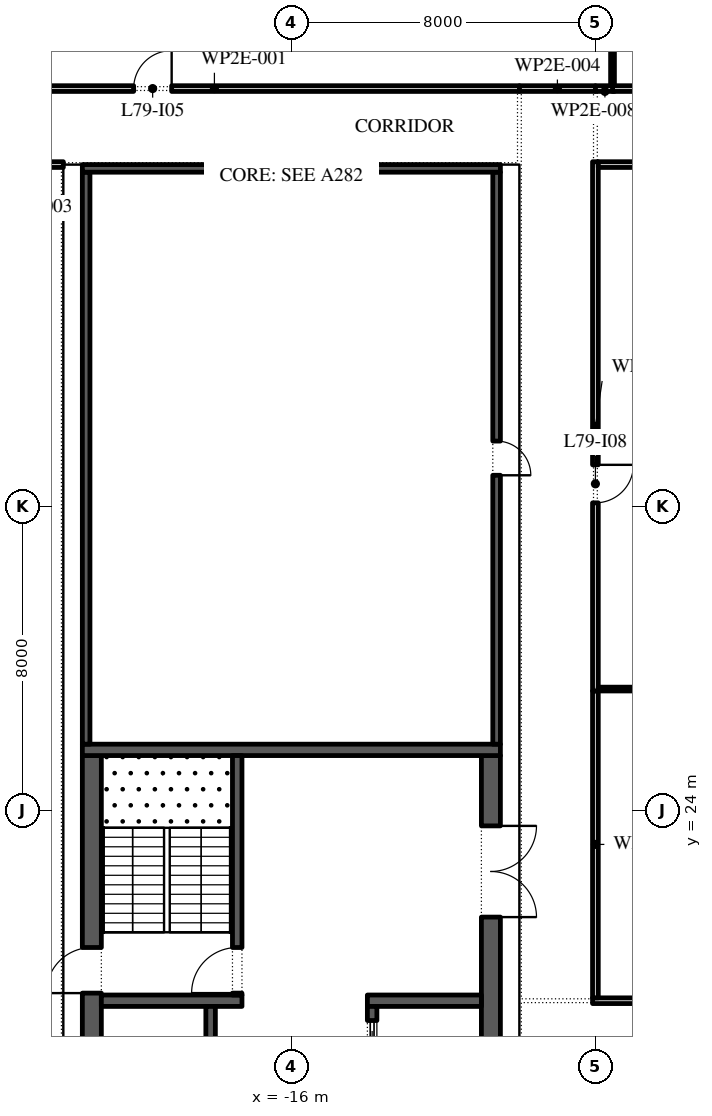
"""IFC4 building model, lengths in metres.
Left out: names, types, materials, properties, quantities, classifications, styles, units other than length and angle.
Written with IfcOpenShell. Run it as: python <this file> out.ifc"""

import sys

from ifc_helpers import new_model, si_unit, direction, frame, frame_2d, origin, place, context, subcontext, project, spatial, rectangle, extrude, element, fill, save


model = new_model("IFC4")
c1 = context("Model", 3, precision=1e-05, world=origin(), true_north=direction((0.0, 1.0)))
c2 = subcontext(c1, "Body", "Model", "MODEL_VIEW")
j1 = project(units=[si_unit("LENGTHUNIT", "METRE"), si_unit("PLANEANGLEUNIT", "RADIAN")], contexts=[c1])
p1 = place(None, origin())
s1 = spatial("IfcSite", under=j1, at=p1, CompositionType="ELEMENT")
p2 = place(p1, origin())
s2 = spatial("IfcBuilding", under=s1, at=p2, CompositionType="ELEMENT")
p3 = place(p2, frame((0.0, 0.0, 359.4)))
s3 = spatial("IfcBuildingStorey", under=s2, at=p3, CompositionType="ELEMENT", Elevation=359.4)
p4 = place(p3, frame((-21.25, -2.45, 0.0), z_axis=(0.0, 0.0, 1.0), x_axis=(0.0, 1.0, 0.0)))
e1 = element("IfcWall", 1, at=p4, inside=s3, PredefinedType="SHEAR", context=c2, shape_type="SweptSolid", body=[
    extrude(rectangle(XDim=27.9, YDim=0.5, at=frame_2d((13.95, 0.0))), origin(), (0.0, 0.0, 1.0), 3.9),
])
p5 = place(p4, frame((5.05, 0.0, 0.0)))
e2 = element("IfcOpeningElement", 2, at=p5, cuts=e1, PredefinedType="OPENING", context=c2, shape_type="SweptSolid", body=[
    extrude(rectangle(XDim=1.2, YDim=2.1, at=frame_2d((0.6, 1.05))), frame((0.0, 0.26, 0.0), z_axis=(0.0, -1.0, 0.0), x_axis=(1.0, 0.0, 0.0)), (0.0, 0.0, 1.0), 0.52),
])
p6 = place(p4, frame((21.65, 0.0, 0.0)))
e3 = element("IfcOpeningElement", 3, at=p6, cuts=e1, PredefinedType="OPENING", context=c2, shape_type="SweptSolid", body=[
    extrude(rectangle(XDim=1.2, YDim=2.1, at=frame_2d((0.6, 1.05))), frame((0.0, 0.26, 0.0), z_axis=(0.0, -1.0, 0.0), x_axis=(1.0, 0.0, 0.0)), (0.0, 0.0, 1.0), 0.52),
])
p7 = place(p3, frame((-10.75, -2.45, 0.0), z_axis=(0.0, 0.0, 1.0), x_axis=(0.0, 1.0, 0.0)))
e4 = element("IfcWall", 4, at=p7, inside=s3, PredefinedType="SHEAR", context=c2, shape_type="SweptSolid", body=[
    extrude(rectangle(XDim=27.9, YDim=0.5, at=frame_2d((13.95, 0.0))), origin(), (0.0, 0.0, 1.0), 3.9),
])
p8 = place(p7, frame((23.65, 0.0, 0.0)))
e5 = element("IfcOpeningElement", 5, at=p8, cuts=e4, PredefinedType="OPENING", context=c2, shape_type="SweptSolid", body=[
    extrude(rectangle(XDim=2.4, YDim=2.1, at=frame_2d((1.2, 1.05))), frame((0.0, 0.26, 0.0), z_axis=(0.0, -1.0, 0.0), x_axis=(1.0, 0.0, 0.0)), (0.0, 0.0, 1.0), 0.52),
])
p9 = place(p7, frame((0.788, 0.0, 0.0)))
e6 = element("IfcOpeningElement", 6, at=p9, cuts=e4, PredefinedType="OPENING", context=c2, shape_type="SweptSolid", body=[
    extrude(rectangle(XDim=0.9, YDim=2.1, at=frame_2d((0.45, 1.05))), frame((0.0, 0.26, 0.0), z_axis=(0.0, -1.0, 0.0), x_axis=(1.0, 0.0, 0.0)), (0.0, 0.0, 1.0), 0.52),
])
p10 = place(p7, frame((3.962, 0.0, 0.0)))
e7 = element("IfcOpeningElement", 7, at=p10, cuts=e4, PredefinedType="OPENING", context=c2, shape_type="SweptSolid", body=[
    extrude(rectangle(XDim=1.0, YDim=2.1, at=frame_2d((0.5, 1.05))), frame((0.0, 0.26, 0.0), z_axis=(0.0, -1.0, 0.0), x_axis=(1.0, 0.0, 0.0)), (0.0, 0.0, 1.0), 0.52),
])
p11 = place(p3, frame((-21.5, 25.6, 0.0), z_axis=(0.0, 0.0, 1.0), x_axis=(1.0, 0.0, 0.0)))
e8 = element("IfcWall", 8, at=p11, inside=s3, PredefinedType="SHEAR", context=c2, shape_type="SweptSolid", body=[
    extrude(rectangle(XDim=11.0, YDim=0.3, at=frame_2d((5.5, 0.0))), origin(), (0.0, 0.0, 1.0), 3.9),
])
p12 = place(p3, frame((-21.0, 19.0, 0.0), z_axis=(0.0, 0.0, 1.0), x_axis=(1.0, 0.0, 0.0)))
e9 = element("IfcWall", 9, at=p12, inside=s3, PredefinedType="SHEAR", context=c2, shape_type="SweptSolid", body=[
    extrude(rectangle(XDim=3.7, YDim=0.3, at=frame_2d((1.85, 0.0))), origin(), (0.0, 0.0, 1.0), 3.9),
])
p13 = place(p3, frame((-17.425, 19.15, 0.0), z_axis=(0.0, 0.0, 1.0), x_axis=(0.0, 1.0, 0.0)))
e10 = element("IfcWall", 10, at=p13, inside=s3, PredefinedType="SHEAR", context=c2, shape_type="SweptSolid", body=[
    extrude(rectangle(XDim=6.3, YDim=0.25, at=frame_2d((3.15, 0.0))), origin(), (0.0, 0.0, 1.0), 3.9),
])
p14 = place(p13, frame((0.05, 0.0, 0.0)))
e11 = element("IfcOpeningElement", 11, at=p14, cuts=e10, PredefinedType="OPENING", context=c2, shape_type="SweptSolid", body=[
    extrude(rectangle(XDim=1.2, YDim=2.1, at=frame_2d((0.6, 1.05))), frame((0.0, 0.135, 0.0), z_axis=(0.0, -1.0, 0.0), x_axis=(1.0, 0.0, 0.0)), (0.0, 0.0, 1.0), 0.27),
])
p15 = place(p3, frame((-18.125, 4.15, 0.0), z_axis=(0.0, 0.0, 1.0), x_axis=(0.0, 1.0, 0.0)))
e12 = element("IfcWall", 12, at=p15, inside=s3, PredefinedType="SHEAR", context=c2, shape_type="SweptSolid", body=[
    extrude(rectangle(XDim=14.7, YDim=0.25, at=frame_2d((7.35, 0.0))), origin(), (0.0, 0.0, 1.0), 3.9),
])
p16 = place(p15, frame((4.846, 0.0, 0.0)))
e13 = element("IfcOpeningElement", 13, at=p16, cuts=e12, PredefinedType="OPENING", context=c2, shape_type="SweptSolid", body=[
    extrude(rectangle(XDim=0.9, YDim=2.1, at=frame_2d((0.45, 1.05))), frame((0.0, 0.135, 0.0), z_axis=(0.0, -1.0, 0.0), x_axis=(1.0, 0.0, 0.0)), (0.0, 0.0, 1.0), 0.27),
])
p17 = place(p15, frame((11.125, 0.0, 0.0)))
e14 = element("IfcOpeningElement", 14, at=p17, cuts=e12, PredefinedType="OPENING", context=c2, shape_type="SweptSolid", body=[
    extrude(rectangle(XDim=0.9, YDim=2.1, at=frame_2d((0.45, 1.05))), frame((0.0, 0.135, 0.0), z_axis=(0.0, -1.0, 0.0), x_axis=(1.0, 0.0, 0.0)), (0.0, 0.0, 1.0), 0.27),
])
p18 = place(p15, frame((0.371, 0.0, 0.0)))
e15 = element("IfcOpeningElement", 15, at=p18, cuts=e12, PredefinedType="OPENING", context=c2, shape_type="SweptSolid", body=[
    extrude(rectangle(XDim=1.1, YDim=2.1, at=frame_2d((0.55, 1.05))), frame((0.0, 0.135, 0.0), z_axis=(0.0, -1.0, 0.0), x_axis=(1.0, 0.0, 0.0)), (0.0, 0.0, 1.0), 0.27),
])
p19 = place(p3, frame((-14.0, 19.0, 0.0), z_axis=(0.0, 0.0, 1.0), x_axis=(1.0, 0.0, 0.0)))
e16 = element("IfcWall", 16, at=p19, inside=s3, PredefinedType="SHEAR", context=c2, shape_type="SweptSolid", body=[
    extrude(rectangle(XDim=3.0, YDim=0.3, at=frame_2d((1.5, 0.0))), origin(), (0.0, 0.0, 1.0), 3.9),
])
p20 = place(p3, frame((-13.875, -2.45, 0.0), z_axis=(0.0, 0.0, 1.0), x_axis=(0.0, 1.0, 0.0)))
e17 = element("IfcWall", 17, at=p20, inside=s3, PredefinedType="SHEAR", context=c2, shape_type="SweptSolid", body=[
    extrude(rectangle(XDim=21.3, YDim=0.25, at=frame_2d((10.65, 0.0))), origin(), (0.0, 0.0, 1.0), 3.9),
])
p21 = place(p20, frame((11.357, 0.0, 0.0)))
e18 = element("IfcOpeningElement", 18, at=p21, cuts=e17, PredefinedType="OPENING", context=c2, shape_type="SweptSolid", body=[
    extrude(rectangle(XDim=0.9, YDim=2.1, at=frame_2d((0.45, 1.05))), frame((0.0, 0.135, 0.0), z_axis=(0.0, -1.0, 0.0), x_axis=(1.0, 0.0, 0.0)), (0.0, 0.0, 1.0), 0.27),
])
p22 = place(p20, frame((6.971, 0.0, 0.0)))
e19 = element("IfcOpeningElement", 19, at=p22, cuts=e17, PredefinedType="OPENING", context=c2, shape_type="SweptSolid", body=[
    extrude(rectangle(XDim=1.1, YDim=2.1, at=frame_2d((0.55, 1.05))), frame((0.0, 0.135, 0.0), z_axis=(0.0, -1.0, 0.0), x_axis=(1.0, 0.0, 0.0)), (0.0, 0.0, 1.0), 0.27),
])
p23 = place(p20, frame((15.543, 0.0, 0.0)))
e20 = element("IfcOpeningElement", 20, at=p23, cuts=e17, PredefinedType="OPENING", context=c2, shape_type="SweptSolid", body=[
    extrude(rectangle(XDim=1.1, YDim=2.1, at=frame_2d((0.55, 1.05))), frame((0.0, 0.135, 0.0), z_axis=(0.0, -1.0, 0.0), x_axis=(1.0, 0.0, 0.0)), (0.0, 0.0, 1.0), 0.27),
])
p24 = place(p20, frame((17.686, 0.0, 0.0)))
e21 = element("IfcOpeningElement", 21, at=p24, cuts=e17, PredefinedType="OPENING", context=c2, shape_type="SweptSolid", body=[
    extrude(rectangle(XDim=1.1, YDim=2.1, at=frame_2d((0.55, 1.05))), frame((0.0, 0.135, 0.0), z_axis=(0.0, -1.0, 0.0), x_axis=(1.0, 0.0, 0.0)), (0.0, 0.0, 1.0), 0.27),
])
p25 = place(p20, frame((19.829, 0.0, 0.0)))
e22 = element("IfcOpeningElement", 22, at=p25, cuts=e17, PredefinedType="OPENING", context=c2, shape_type="SweptSolid", body=[
    extrude(rectangle(XDim=1.1, YDim=2.1, at=frame_2d((0.55, 1.05))), frame((0.0, 0.135, 0.0), z_axis=(0.0, -1.0, 0.0), x_axis=(1.0, 0.0, 0.0)), (0.0, 0.0, 1.0), 0.27),
])
p26 = place(p3, frame((-21.4, 25.75, 0.0), z_axis=(0.0, 0.0, 1.0), x_axis=(0.0, 1.0, 0.0)))
e23 = element("IfcWall", 23, at=p26, inside=s3, PredefinedType="SHEAR", context=c2, shape_type="SweptSolid", body=[
    extrude(rectangle(XDim=15.05, YDim=0.2, at=frame_2d((7.525, 0.0))), origin(), (0.0, 0.0, 1.0), 3.9),
])
p27 = place(p3, frame((-10.6, 25.75, 0.0), z_axis=(0.0, 0.0, 1.0), x_axis=(0.0, 1.0, 0.0)))
e24 = element("IfcWall", 24, at=p27, inside=s3, PredefinedType="SHEAR", context=c2, shape_type="SweptSolid", body=[
    extrude(rectangle(XDim=15.05, YDim=0.2, at=frame_2d((7.525, 0.0))), origin(), (0.0, 0.0, 1.0), 3.9),
])
p28 = place(p27, frame((7.075, 0.0, 0.0)))
e25 = element("IfcOpeningElement", 25, at=p28, cuts=e24, PredefinedType="OPENING", context=c2, shape_type="SweptSolid", body=[
    extrude(rectangle(XDim=0.9, YDim=2.1, at=frame_2d((0.45, 1.05))), frame((0.0, 0.11, 0.0), z_axis=(0.0, -1.0, 0.0), x_axis=(1.0, 0.0, 0.0)), (0.0, 0.0, 1.0), 0.22),
])
p29 = place(p3, frame((-21.5, 40.9, 0.0), z_axis=(0.0, 0.0, 1.0), x_axis=(1.0, 0.0, 0.0)))
e26 = element("IfcWall", 26, at=p29, inside=s3, PredefinedType="SHEAR", context=c2, shape_type="SweptSolid", body=[
    extrude(rectangle(XDim=11.0, YDim=0.2, at=frame_2d((5.5, 0.0))), origin(), (0.0, 0.0, 1.0), 3.9),
])
p30 = place(p3, frame((-26.05, 43.0, 0.0), z_axis=(0.0, 0.0, 1.0), x_axis=(1.0, 0.0, 0.0)))
e27 = element("IfcWall", 27, at=p30, inside=s3, PredefinedType="PARTITIONING", context=c2, shape_type="SweptSolid", body=[
    extrude(rectangle(XDim=16.05, YDim=0.15, at=frame_2d((8.025, 0.0))), origin(), (0.0, 0.0, 1.0), 3.9),
])
p31 = place(p30, frame((5.9, 0.0, 0.0)))
e28 = element("IfcOpeningElement", 28, at=p31, cuts=e27, PredefinedType="OPENING", context=c2, shape_type="SweptSolid", body=[
    extrude(rectangle(XDim=1.0, YDim=2.1, at=frame_2d((0.5, 1.05))), frame((0.0, 0.085, 0.0), z_axis=(0.0, -1.0, 0.0), x_axis=(1.0, 0.0, 0.0)), (0.0, 0.0, 1.0), 0.17),
])
p32 = place(p3, frame((-22.0, 41.0, 0.0), z_axis=(0.0, 0.0, 1.0), x_axis=(-1.0, 0.0, 0.0)))
e29 = element("IfcWall", 29, at=p32, inside=s3, PredefinedType="PARTITIONING", context=c2, shape_type="SweptSolid", body=[
    extrude(rectangle(XDim=4.05, YDim=0.15, at=frame_2d((2.025, 0.0))), origin(), (0.0, 0.0, 1.0), 3.9),
])
p33 = place(p32, frame((2.1, 0.0, 0.0)))
e30 = element("IfcOpeningElement", 30, at=p33, cuts=e29, PredefinedType="OPENING", context=c2, shape_type="SweptSolid", body=[
    extrude(rectangle(XDim=1.0, YDim=2.1, at=frame_2d((0.5, 1.05))), frame((0.0, 0.085, 0.0), z_axis=(0.0, -1.0, 0.0), x_axis=(1.0, 0.0, 0.0)), (0.0, 0.0, 1.0), 0.17),
])
p34 = place(p3, frame((-10.0, 43.0, 0.0), z_axis=(0.0, 0.0, 1.0), x_axis=(1.0, 0.0, 0.0)))
e31 = element("IfcWall", 31, at=p34, inside=s3, PredefinedType="PARTITIONING", context=c2, shape_type="SweptSolid", body=[
    extrude(rectangle(XDim=2.0, YDim=0.15, at=frame_2d((1.0, 0.0))), origin(), (0.0, 0.0, 1.0), 3.9),
])
p35 = place(p3, frame((-8.075, 19.0, 0.0), z_axis=(0.0, 0.0, 1.0), x_axis=(1.0, 0.0, 0.0)))
e32 = element("IfcWall", 32, at=p35, inside=s3, PredefinedType="PARTITIONING", context=c2, shape_type="SweptSolid", body=[
    extrude(rectangle(XDim=16.15, YDim=0.15, at=frame_2d((8.075, 0.0))), origin(), (0.0, 0.0, 1.0), 3.9),
])
p36 = place(p35, frame((5.925, 0.0, 0.0)))
e33 = element("IfcOpeningElement", 33, at=p36, cuts=e32, PredefinedType="OPENING", context=c2, shape_type="SweptSolid", body=[
    extrude(rectangle(XDim=1.0, YDim=2.1, at=frame_2d((0.5, 1.05))), frame((0.0, 0.085, 0.0), z_axis=(0.0, -1.0, 0.0), x_axis=(1.0, 0.0, 0.0)), (0.0, 0.0, 1.0), 0.17),
])
p37 = place(p3, frame((-8.0, 27.15, 0.0), z_axis=(0.0, 0.0, 1.0), x_axis=(0.0, -1.0, 0.0)))
e34 = element("IfcWall", 34, at=p37, inside=s3, PredefinedType="PARTITIONING", context=c2, shape_type="SweptSolid", body=[
    extrude(rectangle(XDim=8.075, YDim=0.15, at=frame_2d((4.038, 0.0))), origin(), (0.0, 0.0, 1.0), 3.9),
])
p38 = place(p3, frame((-8.0, 41.075, 0.0), z_axis=(0.0, 0.0, 1.0), x_axis=(0.0, -1.0, 0.0)))
e35 = element("IfcWall", 35, at=p38, inside=s3, PredefinedType="PARTITIONING", context=c2, shape_type="SweptSolid", body=[
    extrude(rectangle(XDim=13.925, YDim=0.15, at=frame_2d((6.962, 0.0))), origin(), (0.0, 0.0, 1.0), 3.9),
])
p39 = place(p38, frame((7.975, 0.0, 0.0)))
e36 = element("IfcOpeningElement", 36, at=p39, cuts=e35, PredefinedType="OPENING", context=c2, shape_type="SweptSolid", body=[
    extrude(rectangle(XDim=1.0, YDim=2.1, at=frame_2d((0.5, 1.05))), frame((0.0, 0.085, 0.0), z_axis=(0.0, -1.0, 0.0), x_axis=(1.0, 0.0, 0.0)), (0.0, 0.0, 1.0), 0.17),
])
p40 = place(p3, frame((-8.0, 43.0, 0.0), z_axis=(0.0, 0.0, 1.0), x_axis=(1.0, 0.0, 0.0)))
e37 = element("IfcWall", 37, at=p40, inside=s3, PredefinedType="PARTITIONING", context=c2, shape_type="SweptSolid", body=[
    extrude(rectangle(XDim=0.5, YDim=0.15, at=frame_2d((0.25, 0.0))), origin(), (0.0, 0.0, 1.0), 3.9),
])
p41 = place(p3, frame((-7.55, 43.075, 0.0), z_axis=(0.0, 0.0, 1.0), x_axis=(0.0, 1.0, 0.0)))
e38 = element("IfcWall", 38, at=p41, inside=s3, PredefinedType="PARTITIONING", context=c2, shape_type="SweptSolid", body=[
    extrude(rectangle(XDim=9.725, YDim=0.1, at=frame_2d((4.863, 0.0))), origin(), (0.0, 0.0, 1.0), 3.9),
])
p42 = place(p3, frame((-7.55, 43.0, 0.0), z_axis=(0.0, 0.0, 1.0), x_axis=(1.0, 0.0, 0.0)))
e39 = element("IfcWall", 39, at=p42, inside=s3, PredefinedType="PARTITIONING", context=c2, shape_type="SweptSolid", body=[
    extrude(rectangle(XDim=7.5, YDim=0.15, at=frame_2d((3.75, 0.0))), origin(), (0.0, 0.0, 1.0), 3.9),
])
p43 = place(p42, frame((1.65, 0.0, 0.0)))
e40 = element("IfcOpeningElement", 40, at=p43, cuts=e39, PredefinedType="OPENING", context=c2, shape_type="SweptSolid", body=[
    extrude(rectangle(XDim=1.0, YDim=2.1, at=frame_2d((0.5, 1.05))), frame((0.0, 0.085, 0.0), z_axis=(0.0, -1.0, 0.0), x_axis=(1.0, 0.0, 0.0)), (0.0, 0.0, 1.0), 0.17),
])
p44 = place(p3, frame((-2.95, 27.2, 0.0), z_axis=(0.0, 0.0, 1.0), x_axis=(-1.0, 0.0, 0.0)))
e41 = element("IfcWall", 41, at=p44, inside=s3, PredefinedType="PARTITIONING", context=c2, shape_type="SweptSolid", body=[
    extrude(rectangle(XDim=4.975, YDim=0.1, at=frame_2d((2.488, 0.0))), origin(), (0.0, 0.0, 1.0), 3.9),
])
p45 = place(p3, frame((-3.05, 41.0, 0.0), z_axis=(0.0, 0.0, 1.0), x_axis=(-1.0, 0.0, 0.0)))
e42 = element("IfcWall", 42, at=p45, inside=s3, PredefinedType="PARTITIONING", context=c2, shape_type="SweptSolid", body=[
    extrude(rectangle(XDim=4.875, YDim=0.15, at=frame_2d((2.438, 0.0))), origin(), (0.0, 0.0, 1.0), 3.9),
])
p46 = place(p25, origin())
e43 = element("IfcDoor", 43, at=p46, inside=s3, OperationType="SLIDING_TO_LEFT", PredefinedType="DOOR", context=c2, shape_type="SweptSolid", body=[
    extrude(rectangle(XDim=1.1, YDim=2.1, at=frame_2d((0.55, 1.05))), frame((0.0, 0.025, 0.0), z_axis=(0.0, -1.0, 0.0), x_axis=(1.0, 0.0, 0.0)), (0.0, 0.0, 1.0), 0.05),
])
fill(e22, e43)
p47 = place(p8, frame((2.4, 0.0, 0.0), z_axis=(0.0, 0.0, 1.0), x_axis=(-1.0, 0.0, 0.0)))
e44 = element("IfcDoor", 44, at=p47, inside=s3, OperationType="DOUBLE_DOOR_SINGLE_SWING", PredefinedType="DOOR", context=c2, shape_type="SweptSolid", body=[
    extrude(rectangle(XDim=2.4, YDim=2.1, at=frame_2d((1.2, 1.05))), frame((0.0, 0.025, 0.0), z_axis=(0.0, -1.0, 0.0), x_axis=(1.0, 0.0, 0.0)), (0.0, 0.0, 1.0), 0.05),
])
fill(e5, e44)
p48 = place(p14, origin())
e45 = element("IfcDoor", 45, at=p48, inside=s3, OperationType="SINGLE_SWING_RIGHT", PredefinedType="DOOR", context=c2, shape_type="SweptSolid", body=[
    extrude(rectangle(XDim=1.2, YDim=2.1, at=frame_2d((0.6, 1.05))), frame((0.0, 0.025, 0.0), z_axis=(0.0, -1.0, 0.0), x_axis=(1.0, 0.0, 0.0)), (0.0, 0.0, 1.0), 0.05),
])
fill(e11, e45)
p49 = place(p6, origin())
e46 = element("IfcDoor", 46, at=p49, inside=s3, OperationType="SINGLE_SWING_RIGHT", PredefinedType="DOOR", context=c2, shape_type="SweptSolid", body=[
    extrude(rectangle(XDim=1.2, YDim=2.1, at=frame_2d((0.6, 1.05))), frame((0.0, 0.025, 0.0), z_axis=(0.0, -1.0, 0.0), x_axis=(1.0, 0.0, 0.0)), (0.0, 0.0, 1.0), 0.05),
])
fill(e3, e46)
p50 = place(p28, frame((0.9, 0.15, 0.0), z_axis=(0.0, 0.0, 1.0), x_axis=(-1.0, 0.0, 0.0)))
e47 = element("IfcDoor", 47, at=p50, inside=s3, OperationType="SINGLE_SWING_LEFT", PredefinedType="DOOR", context=c2, shape_type="SweptSolid", body=[
    extrude(rectangle(XDim=0.9, YDim=2.1, at=frame_2d((0.45, 1.05))), frame((0.0, 0.1, 0.0), z_axis=(0.0, -1.0, 0.0), x_axis=(1.0, 0.0, 0.0)), (0.0, 0.0, 1.0), 0.05),
])
fill(e25, e47)
p51 = place(p31, origin())
e48 = element("IfcDoor", 48, at=p51, inside=s3, OperationType="SINGLE_SWING_LEFT", PredefinedType="DOOR", context=c2, shape_type="SweptSolid", body=[
    extrude(rectangle(XDim=1.0, YDim=2.1, at=frame_2d((0.5, 1.05))), frame((0.0, 0.025, 0.0), z_axis=(0.0, -1.0, 0.0), x_axis=(1.0, 0.0, 0.0)), (0.0, 0.0, 1.0), 0.05),
])
fill(e28, e48)
p52 = place(p39, origin())
e49 = element("IfcDoor", 49, at=p52, inside=s3, OperationType="SINGLE_SWING_RIGHT", PredefinedType="DOOR", context=c2, shape_type="SweptSolid", body=[
    extrude(rectangle(XDim=1.0, YDim=2.1, at=frame_2d((0.5, 1.05))), frame((0.0, 0.025, 0.0), z_axis=(0.0, -1.0, 0.0), x_axis=(1.0, 0.0, 0.0)), (0.0, 0.0, 1.0), 0.05),
])
fill(e36, e49)
save(model, sys.argv[1])
